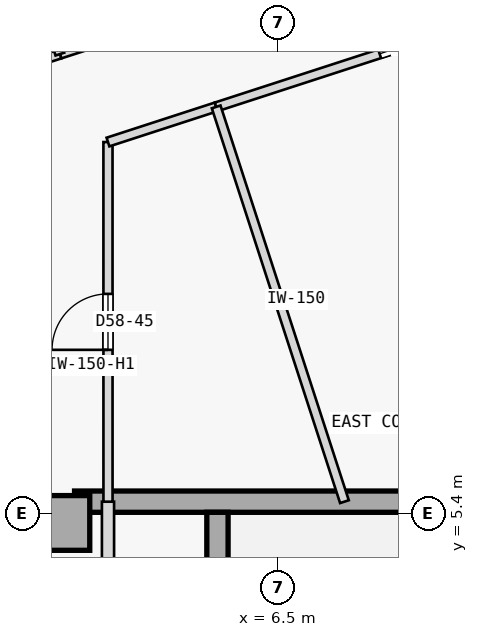
"""IFC4 building model, lengths in metres.
Left out: names, types, materials, properties, quantities, classifications, styles, units other than length and angle.
Written with IfcOpenShell. Run it as: python <this file> out.ifc"""

import sys

from ifc_helpers import new_model, si_unit, direction, frame, frame_2d, origin, origin_2d, place, context, subcontext, project, spatial, rectangle, extrude, element, fill, save


model = new_model("IFC4")
c1 = context("Model", 3, precision=1e-05, world=origin(), true_north=direction((0.0, 1.0)))
c2 = subcontext(c1, "Body", "Model", "MODEL_VIEW")
j1 = project(units=[si_unit("LENGTHUNIT", "METRE"), si_unit("PLANEANGLEUNIT", "RADIAN")], contexts=[c1])
p1 = place(None, origin())
s1 = spatial("IfcSite", under=j1, at=p1, CompositionType="ELEMENT")
p2 = place(p1, origin())
s2 = spatial("IfcBuilding", under=s1, at=p2, CompositionType="ELEMENT")
p3 = place(p2, frame((0.0, 0.0, 220.95)))
s3 = spatial("IfcBuildingStorey", under=s2, at=p3, CompositionType="ELEMENT", Elevation=220.95)
p4 = place(p3, frame((2.95, 5.25, 0.0), z_axis=(0.0, 0.0, 1.0), x_axis=(1.0, 0.0, 0.0)))
e1 = element("IfcColumn", 1, at=p4, inside=s3, PredefinedType="COLUMN", context=c2, shape_type="SweptSolid", body=[
    extrude(rectangle(XDim=0.9, YDim=0.9, at=origin_2d()), origin(), (0.0, 0.0, 1.0), 3.35),
])
p5 = place(p3, frame((3.15, 5.6, 0.0), z_axis=(0.0, 0.0, 1.0), x_axis=(1.0, 0.0, 0.0)))
e2 = element("IfcWall", 2, at=p5, inside=s3, PredefinedType="SHEAR", context=c2, shape_type="SweptSolid", body=[
    extrude(rectangle(XDim=11.41, YDim=0.35, at=frame_2d((5.705, 0.0))), origin(), (0.0, 0.0, 1.0), 3.125),
])
p6 = place(p3, frame((5.5, 2.15, 0.0), z_axis=(0.0, 0.0, 1.0), x_axis=(0.0, 1.0, 0.0)))
e3 = element("IfcWall", 3, at=p6, inside=s3, PredefinedType="SHEAR", context=c2, shape_type="SweptSolid", body=[
    extrude(rectangle(XDim=3.275, YDim=0.35, at=frame_2d((1.638, 0.0))), origin(), (0.0, 0.0, 1.0), 3.125),
])
p7 = place(p3, frame((3.7, -1.15, 0.0), z_axis=(0.0, 0.0, 1.0), x_axis=(0.0, 1.0, 0.0)))
e4 = element("IfcWall", 4, at=p7, inside=s3, PredefinedType="STANDARD", context=c2, shape_type="SweptSolid", body=[
    extrude(rectangle(XDim=6.75, YDim=0.2, at=frame_2d((3.375, 0.0))), origin(), (0.0, 0.0, 1.0), 3.125),
])
p8 = place(p7, frame((0.35, 0.0, 0.0)))
e5 = element("IfcOpeningElement", 5, at=p8, cuts=e4, PredefinedType="OPENING", context=c2, shape_type="SweptSolid", body=[
    extrude(rectangle(XDim=0.88, YDim=2.15, at=frame_2d((0.44, 1.075))), frame((0.0, 0.11, 0.0), z_axis=(0.0, -1.0, 0.0), x_axis=(1.0, 0.0, 0.0)), (0.0, 0.0, 1.0), 0.22),
])
p9 = place(p7, frame((2.55, 0.0, 0.0)))
e6 = element("IfcOpeningElement", 6, at=p9, cuts=e4, PredefinedType="OPENING", context=c2, shape_type="SweptSolid", body=[
    extrude(rectangle(XDim=0.92, YDim=2.15, at=frame_2d((0.46, 1.075))), frame((0.0, 0.11, 0.0), z_axis=(0.0, -1.0, 0.0), x_axis=(1.0, 0.0, 0.0)), (0.0, 0.0, 1.0), 0.22),
])
p10 = place(p7, frame((4.22, 0.0, 0.0)))
e7 = element("IfcOpeningElement", 7, at=p10, cuts=e4, PredefinedType="OPENING", context=c2, shape_type="SweptSolid", body=[
    extrude(rectangle(XDim=0.88, YDim=2.15, at=frame_2d((0.44, 1.075))), frame((0.0, 0.11, 0.0), z_axis=(0.0, -1.0, 0.0), x_axis=(1.0, 0.0, 0.0)), (0.0, 0.0, 1.0), 0.22),
])
p11 = place(p3, frame((2.909, 12.96, 0.0), z_axis=(0.0, 0.0, 1.0), x_axis=(0.951056113966, 0.309018232614, 0.0)))
e8 = element("IfcWall", 8, at=p11, inside=s3, PredefinedType="PARTITIONING", context=c2, shape_type="SweptSolid", body=[
    extrude(rectangle(XDim=21.076, YDim=0.15, at=frame_2d((10.538, 0.0))), origin(), (0.0, 0.0, 1.0), 3.125),
])
p12 = place(p11, frame((10.063, 0.0, 0.0)))
e9 = element("IfcOpeningElement", 9, at=p12, cuts=e8, PredefinedType="OPENING", context=c2, shape_type="SweptSolid", body=[
    extrude(rectangle(XDim=0.95, YDim=2.15, at=frame_2d((0.475, 1.075))), frame((0.0, 0.085, 0.0), z_axis=(0.0, -1.0, 0.0), x_axis=(1.0, 0.0, 0.0)), (0.0, 0.0, 1.0), 0.17),
])
p13 = place(p3, frame((-1.228, 11.616, 0.0), z_axis=(0.0, 0.0, 1.0), x_axis=(0.951069122051, 0.308978195154, 0.0)))
e10 = element("IfcWall", 10, at=p13, inside=s3, PredefinedType="PARTITIONING", context=c2, shape_type="SweptSolid", body=[
    extrude(rectangle(XDim=4.35, YDim=0.15, at=frame_2d((2.175, 0.0))), origin(), (0.0, 0.0, 1.0), 3.125),
])
p14 = place(p3, frame((3.7, 5.6, 0.0), z_axis=(0.0, 0.0, 1.0), x_axis=(-0.000123839008, 0.999999992332, 0.0)))
e11 = element("IfcWall", 11, at=p14, inside=s3, PredefinedType="PARTITIONING", context=c2, shape_type="SweptSolid", body=[
    extrude(rectangle(XDim=5.914, YDim=0.15, at=frame_2d((2.957, 0.0))), origin(), (0.0, 0.0, 1.0), 2.675),
])
p15 = place(p14, frame((2.497, 0.0, 0.0)))
e12 = element("IfcOpeningElement", 12, at=p15, cuts=e11, PredefinedType="OPENING", context=c2, shape_type="SweptSolid", body=[
    extrude(rectangle(XDim=0.92, YDim=2.15, at=frame_2d((0.46, 1.075))), frame((0.0, 0.085, 0.0), z_axis=(0.0, -1.0, 0.0), x_axis=(1.0, 0.0, 0.0)), (0.0, 0.0, 1.0), 0.17),
])
p16 = place(p3, frame((3.699, 11.514, 0.0), z_axis=(0.0, 0.0, 1.0), x_axis=(0.951069540665, 0.308976906612, 0.0)))
e13 = element("IfcWall", 13, at=p16, inside=s3, PredefinedType="PARTITIONING", context=c2, shape_type="SweptSolid", body=[
    extrude(rectangle(XDim=1.871, YDim=0.15, at=frame_2d((0.936, 0.0))), origin(), (0.0, 0.0, 1.0), 3.125),
])
p17 = place(p3, frame((5.479, 12.092, 0.0), z_axis=(0.0, 0.0, 1.0), x_axis=(0.951051809397, 0.309031480343, 0.0)))
e14 = element("IfcWall", 14, at=p17, inside=s3, PredefinedType="PARTITIONING", context=c2, shape_type="SweptSolid", body=[
    extrude(rectangle(XDim=6.573, YDim=0.15, at=frame_2d((3.287, 0.0))), origin(), (0.0, 0.0, 1.0), 3.125),
])
p18 = place(p17, frame((2.826, 0.0, 0.0)))
e15 = element("IfcOpeningElement", 15, at=p18, cuts=e14, PredefinedType="OPENING", context=c2, shape_type="SweptSolid", body=[
    extrude(rectangle(XDim=0.92, YDim=2.15, at=frame_2d((0.46, 1.075))), frame((0.0, 0.085, 0.0), z_axis=(0.0, -1.0, 0.0), x_axis=(1.0, 0.0, 0.0)), (0.0, 0.0, 1.0), 0.17),
])
p19 = place(p3, frame((2.909, 12.96, 0.0), z_axis=(0.0, 0.0, 1.0), x_axis=(-0.308912611775, 0.951090425925, 0.0)))
e16 = element("IfcWall", 16, at=p19, inside=s3, PredefinedType="PARTITIONING", context=c2, shape_type="SweptSolid", body=[
    extrude(rectangle(XDim=2.005, YDim=0.15, at=frame_2d((1.002, 0.0))), origin(), (0.0, 0.0, 1.0), 3.125),
])
p20 = place(p3, frame((7.588, 5.6, 0.0), z_axis=(0.0, 0.0, 1.0), x_axis=(-0.309018946982, 0.951055881852, 0.0)))
e17 = element("IfcWall", 17, at=p20, inside=s3, PredefinedType="PARTITIONING", context=c2, shape_type="SweptSolid", body=[
    extrude(rectangle(XDim=6.826, YDim=0.15, at=frame_2d((3.413, 0.0))), origin(), (0.0, 0.0, 1.0), 3.125),
])
p21 = place(p15, origin())
e18 = element("IfcDoor", 18, at=p21, inside=s3, OperationType="SINGLE_SWING_LEFT", PredefinedType="DOOR", context=c2, shape_type="SweptSolid", body=[
    extrude(rectangle(XDim=0.92, YDim=2.15, at=frame_2d((0.46, 1.075))), frame((0.0, 0.025, 0.0), z_axis=(0.0, -1.0, 0.0), x_axis=(1.0, 0.0, 0.0)), (0.0, 0.0, 1.0), 0.05),
])
fill(e12, e18)
p22 = place(p18, origin())
e19 = element("IfcDoor", 19, at=p22, inside=s3, OperationType="SINGLE_SWING_RIGHT", PredefinedType="DOOR", context=c2, shape_type="SweptSolid", body=[
    extrude(rectangle(XDim=0.92, YDim=2.15, at=frame_2d((0.46, 1.075))), frame((0.0, 0.025, 0.0), z_axis=(0.0, -1.0, 0.0), x_axis=(1.0, 0.0, 0.0)), (0.0, 0.0, 1.0), 0.05),
])
fill(e15, e19)
save(model, sys.argv[1])
